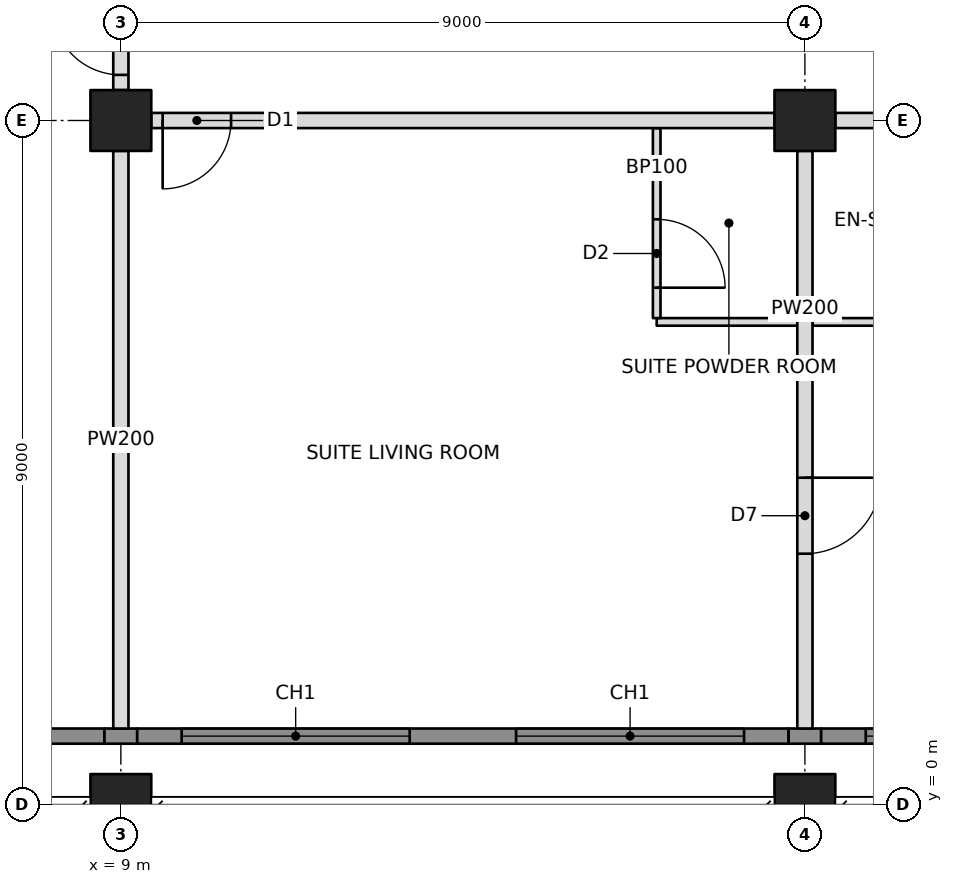
"""IFC4 building model, lengths in metres.
Left out: names, types, materials, properties, quantities, classifications, styles, units other than length and angle.
Written with IfcOpenShell. Run it as: python <this file> out.ifc"""

import sys

from ifc_helpers import new_model, si_unit, direction, frame, frame_2d, origin, origin_2d, place, context, subcontext, project, spatial, rectangle, hollow_rectangle, extrude, element, fill, save


model = new_model("IFC4")
c1 = context("Model", 3, precision=1e-05, world=origin(), true_north=direction((0.0, 1.0)))
c2 = subcontext(c1, "Body", "Model", "MODEL_VIEW")
j1 = project(units=[si_unit("LENGTHUNIT", "METRE"), si_unit("PLANEANGLEUNIT", "RADIAN")], contexts=[c1])
p1 = place(None, origin())
s1 = spatial("IfcSite", under=j1, at=p1, CompositionType="ELEMENT")
p2 = place(p1, origin())
s2 = spatial("IfcBuilding", under=s1, at=p2, CompositionType="ELEMENT")
p3 = place(p2, frame((0.0, 0.0, 218.2)))
s3 = spatial("IfcBuildingStorey", under=s2, at=p3, CompositionType="ELEMENT", Elevation=218.2)
p4 = place(p3, frame((9.0, 0.0, 0.0), z_axis=(0.0, 0.0, 1.0), x_axis=(1.0, 0.0, 0.0)))
e1 = element("IfcColumn", 1, at=p4, inside=s3, PredefinedType="COLUMN", context=c2, shape_type="SweptSolid", body=[
    extrude(hollow_rectangle(XDim=0.8, YDim=0.8, WallThickness=0.06, at=origin_2d()), origin(), (0.0, 0.0, 1.0), 3.4),
])
p5 = place(p3, frame((9.0, 9.0, 0.0), z_axis=(0.0, 0.0, 1.0), x_axis=(1.0, 0.0, 0.0)))
e2 = element("IfcColumn", 2, at=p5, inside=s3, PredefinedType="COLUMN", context=c2, shape_type="SweptSolid", body=[
    extrude(hollow_rectangle(XDim=0.8, YDim=0.8, WallThickness=0.1, at=origin_2d()), origin(), (0.0, 0.0, 1.0), 3.4),
])
p6 = place(p3, frame((18.0, 0.0, 0.0), z_axis=(0.0, 0.0, 1.0), x_axis=(1.0, 0.0, 0.0)))
e3 = element("IfcColumn", 3, at=p6, inside=s3, PredefinedType="COLUMN", context=c2, shape_type="SweptSolid", body=[
    extrude(hollow_rectangle(XDim=0.8, YDim=0.8, WallThickness=0.06, at=origin_2d()), origin(), (0.0, 0.0, 1.0), 3.4),
])
p7 = place(p3, frame((18.0, 9.0, 0.0), z_axis=(0.0, 0.0, 1.0), x_axis=(1.0, 0.0, 0.0)))
e4 = element("IfcColumn", 4, at=p7, inside=s3, PredefinedType="COLUMN", context=c2, shape_type="SweptSolid", body=[
    extrude(hollow_rectangle(XDim=0.8, YDim=0.8, WallThickness=0.1, at=origin_2d()), origin(), (0.0, 0.0, 1.0), 3.4),
])
p8 = place(p3, frame((3.0, 0.9, 0.0), z_axis=(0.0, 0.0, 1.0), x_axis=(1.0, 0.0, 0.0)))
e5 = element("IfcWall", 5, at=p8, inside=s3, PredefinedType="SOLIDWALL", context=c2, shape_type="SweptSolid", body=[
    extrude(rectangle(XDim=5.785, YDim=0.2, at=frame_2d((2.892, 0.0))), origin(), (0.0, 0.0, 1.0), 3.15),
])
p9 = place(p8, frame((1.45, 0.0, 0.6)))
e6 = element("IfcOpeningElement", 6, at=p9, cuts=e5, PredefinedType="OPENING", context=c2, shape_type="SweptSolid", body=[
    extrude(rectangle(XDim=3.0, YDim=2.2, at=frame_2d((1.5, 1.1))), frame((0.0, 0.11, 0.0), z_axis=(0.0, -1.0, 0.0), x_axis=(1.0, 0.0, 0.0)), (0.0, 0.0, 1.0), 0.22),
])
p10 = place(p3, frame((9.4, 9.0, 0.0), z_axis=(0.0, 0.0, 1.0), x_axis=(1.0, 0.0, 0.0)))
e7 = element("IfcWall", 7, at=p10, inside=s3, PredefinedType="PARTITIONING", context=c2, shape_type="SweptSolid", body=[
    extrude(rectangle(XDim=8.2, YDim=0.2, at=frame_2d((4.1, 0.0))), origin(), (0.0, 0.0, 1.0), 2.21),
])
p11 = place(p10, frame((0.15, 0.0, 0.0)))
e8 = element("IfcOpeningElement", 8, at=p11, cuts=e7, PredefinedType="OPENING", context=c2, shape_type="SweptSolid", body=[
    extrude(rectangle(XDim=0.9, YDim=2.1, at=frame_2d((0.45, 1.05))), frame((0.0, 0.11, 0.0), z_axis=(0.0, -1.0, 0.0), x_axis=(1.0, 0.0, 0.0)), (0.0, 0.0, 1.0), 0.22),
])
p12 = place(p3, frame((18.4, 9.0, 0.0), z_axis=(0.0, 0.0, 1.0), x_axis=(1.0, 0.0, 0.0)))
e9 = element("IfcWall", 9, at=p12, inside=s3, PredefinedType="PARTITIONING", context=c2, shape_type="SweptSolid", body=[
    extrude(rectangle(XDim=8.2, YDim=0.2, at=frame_2d((4.1, 0.0))), origin(), (0.0, 0.0, 1.0), 2.21),
])
p13 = place(p12, frame((2.95, 0.0, 0.0)))
e10 = element("IfcOpeningElement", 10, at=p13, cuts=e9, PredefinedType="OPENING", context=c2, shape_type="SweptSolid", body=[
    extrude(rectangle(XDim=0.9, YDim=2.1, at=frame_2d((0.45, 1.05))), frame((0.0, 0.11, 0.0), z_axis=(0.0, -1.0, 0.0), x_axis=(1.0, 0.0, 0.0)), (0.0, 0.0, 1.0), 0.22),
])
p14 = place(p12, frame((4.35, 0.0, 0.0)))
e11 = element("IfcOpeningElement", 11, at=p14, cuts=e9, PredefinedType="OPENING", context=c2, shape_type="SweptSolid", body=[
    extrude(rectangle(XDim=0.9, YDim=2.1, at=frame_2d((0.45, 1.05))), frame((0.0, 0.11, 0.0), z_axis=(0.0, -1.0, 0.0), x_axis=(1.0, 0.0, 0.0)), (0.0, 0.0, 1.0), 0.22),
])
p15 = place(p3, frame((9.0, 8.6, 0.0), z_axis=(0.0, 0.0, 1.0), x_axis=(0.0, -1.0, 0.0)))
e12 = element("IfcWall", 12, at=p15, inside=s3, PredefinedType="PARTITIONING", context=c2, shape_type="SweptSolid", body=[
    extrude(rectangle(XDim=7.6, YDim=0.2, at=frame_2d((3.8, 0.0))), origin(), (0.0, 0.0, 1.0), 2.21),
])
p16 = place(p3, frame((18.0, 8.6, 0.0), z_axis=(0.0, 0.0, 1.0), x_axis=(0.0, -1.0, 0.0)))
e13 = element("IfcWall", 13, at=p16, inside=s3, PredefinedType="PARTITIONING", context=c2, shape_type="SweptSolid", body=[
    extrude(rectangle(XDim=7.6, YDim=0.2, at=frame_2d((3.8, 0.0))), origin(), (0.0, 0.0, 1.0), 2.203),
])
p17 = place(p16, frame((4.3, 0.0, 0.0)))
e14 = element("IfcOpeningElement", 14, at=p17, cuts=e13, PredefinedType="OPENING", context=c2, shape_type="SweptSolid", body=[
    extrude(rectangle(XDim=1.0, YDim=2.1, at=frame_2d((0.5, 1.05))), frame((0.0, 0.11, 0.0), z_axis=(0.0, -1.0, 0.0), x_axis=(1.0, 0.0, 0.0)), (0.0, 0.0, 1.0), 0.22),
])
p18 = place(p3, frame((16.05, 6.35, 0.0), z_axis=(0.0, 0.0, 1.0), x_axis=(1.0, 0.0, 0.0)))
e15 = element("IfcWall", 15, at=p18, inside=s3, PredefinedType="PARTITIONING", context=c2, shape_type="SweptSolid", body=[
    extrude(rectangle(XDim=1.85, YDim=0.1, at=frame_2d((0.925, 0.0))), origin(), (0.0, 0.0, 1.0), 2.202),
])
p19 = place(p3, frame((16.05, 8.9, 0.0), z_axis=(0.0, 0.0, 1.0), x_axis=(0.0, -1.0, 0.0)))
e16 = element("IfcWall", 16, at=p19, inside=s3, PredefinedType="PARTITIONING", context=c2, shape_type="SweptSolid", body=[
    extrude(rectangle(XDim=2.5, YDim=0.1, at=frame_2d((1.25, 0.0))), origin(), (0.0, 0.0, 1.0), 2.21),
])
p20 = place(p19, frame((1.2, 0.0, 0.0)))
e17 = element("IfcOpeningElement", 17, at=p20, cuts=e16, PredefinedType="OPENING", context=c2, shape_type="SweptSolid", body=[
    extrude(rectangle(XDim=0.9, YDim=2.1, at=frame_2d((0.45, 1.05))), frame((0.0, 0.06, 0.0), z_axis=(0.0, -1.0, 0.0), x_axis=(1.0, 0.0, 0.0)), (0.0, 0.0, 1.0), 0.12),
])
p21 = place(p3, frame((18.1, 6.35, 0.0), z_axis=(0.0, 0.0, 1.0), x_axis=(1.0, 0.0, 0.0)))
e18 = element("IfcWall", 18, at=p21, inside=s3, PredefinedType="PARTITIONING", context=c2, shape_type="SweptSolid", body=[
    extrude(rectangle(XDim=2.95, YDim=0.1, at=frame_2d((1.475, 0.0))), origin(), (0.0, 0.0, 1.0), 2.202),
])
p22 = place(p3, frame((9.0, 9.4, 0.0), z_axis=(0.0, 0.0, 1.0), x_axis=(0.0, 1.0, 0.0)))
e19 = element("IfcWall", 19, at=p22, inside=s3, PredefinedType="PARTITIONING", context=c2, shape_type="SweptSolid", body=[
    extrude(rectangle(XDim=1.3, YDim=0.2, at=frame_2d((0.65, 0.0))), origin(), (0.0, 0.0, 1.0), 2.21),
])
p23 = place(p22, frame((0.2, 0.0, 0.0)))
e20 = element("IfcOpeningElement", 20, at=p23, cuts=e19, PredefinedType="OPENING", context=c2, shape_type="SweptSolid", body=[
    extrude(rectangle(XDim=0.9, YDim=2.1, at=frame_2d((0.45, 1.05))), frame((0.0, 0.11, 0.0), z_axis=(0.0, -1.0, 0.0), x_axis=(1.0, 0.0, 0.0)), (0.0, 0.0, 1.0), 0.22),
])
p24 = place(p3, frame((8.785, 0.9, 0.0), z_axis=(0.0, 0.0, 1.0), x_axis=(1.0, 0.0, 0.0)))
e21 = element("IfcWall", 21, at=p24, inside=s3, PredefinedType="SOLIDWALL", context=c2, shape_type="SweptSolid", body=[
    extrude(rectangle(XDim=0.431, YDim=0.2, at=frame_2d((0.215, 0.0))), origin(), (0.0, 0.0, 1.0), 2.21),
])
p25 = place(p3, frame((9.215, 0.9, 0.0), z_axis=(0.0, 0.0, 1.0), x_axis=(1.0, 0.0, 0.0)))
e22 = element("IfcWall", 22, at=p25, inside=s3, PredefinedType="SOLIDWALL", context=c2, shape_type="SweptSolid", body=[
    extrude(rectangle(XDim=8.571, YDim=0.2, at=frame_2d((4.285, 0.0))), origin(), (0.0, 0.0, 1.0), 3.15),
])
p26 = place(p25, frame((0.585, 0.0, 0.6)))
e23 = element("IfcOpeningElement", 23, at=p26, cuts=e22, PredefinedType="OPENING", context=c2, shape_type="SweptSolid", body=[
    extrude(rectangle(XDim=3.0, YDim=2.2, at=frame_2d((1.5, 1.1))), frame((0.0, 0.11, 0.0), z_axis=(0.0, -1.0, 0.0), x_axis=(1.0, 0.0, 0.0)), (0.0, 0.0, 1.0), 0.22),
])
p27 = place(p25, frame((4.985, 0.0, 0.6)))
e24 = element("IfcOpeningElement", 24, at=p27, cuts=e22, PredefinedType="OPENING", context=c2, shape_type="SweptSolid", body=[
    extrude(rectangle(XDim=3.0, YDim=2.2, at=frame_2d((1.5, 1.1))), frame((0.0, 0.11, 0.0), z_axis=(0.0, -1.0, 0.0), x_axis=(1.0, 0.0, 0.0)), (0.0, 0.0, 1.0), 0.22),
])
p28 = place(p3, frame((17.786, 0.9, 0.0), z_axis=(0.0, 0.0, 1.0), x_axis=(1.0, 0.0, 0.0)))
e25 = element("IfcWall", 25, at=p28, inside=s3, PredefinedType="SOLIDWALL", context=c2, shape_type="SweptSolid", body=[
    extrude(rectangle(XDim=0.428, YDim=0.2, at=frame_2d((0.214, 0.0))), origin(), (0.0, 0.0, 1.0), 2.202),
])
p29 = place(p3, frame((18.214, 0.9, 0.0), z_axis=(0.0, 0.0, 1.0), x_axis=(1.0, 0.0, 0.0)))
e26 = element("IfcWall", 26, at=p29, inside=s3, PredefinedType="SOLIDWALL", context=c2, shape_type="SweptSolid", body=[
    extrude(rectangle(XDim=8.572, YDim=0.2, at=frame_2d((4.286, 0.0))), origin(), (0.0, 0.0, 1.0), 3.15),
])
p30 = place(p29, frame((0.586, 0.0, 0.6)))
e27 = element("IfcOpeningElement", 27, at=p30, cuts=e26, PredefinedType="OPENING", context=c2, shape_type="SweptSolid", body=[
    extrude(rectangle(XDim=3.0, YDim=2.2, at=frame_2d((1.5, 1.1))), frame((0.0, 0.11, 0.0), z_axis=(0.0, -1.0, 0.0), x_axis=(1.0, 0.0, 0.0)), (0.0, 0.0, 1.0), 0.22),
])
p31 = place(p29, frame((4.986, 0.0, 0.6)))
e28 = element("IfcOpeningElement", 28, at=p31, cuts=e26, PredefinedType="OPENING", context=c2, shape_type="SweptSolid", body=[
    extrude(rectangle(XDim=3.0, YDim=2.2, at=frame_2d((1.5, 1.1))), frame((0.0, 0.11, 0.0), z_axis=(0.0, -1.0, 0.0), x_axis=(1.0, 0.0, 0.0)), (0.0, 0.0, 1.0), 0.22),
])
p32 = place(p26, origin())
e29 = element("IfcWindow", 29, at=p32, inside=s3, PartitioningType="TRIPLE_PANEL_VERTICAL", PredefinedType="WINDOW", context=c2, shape_type="SweptSolid", body=[
    extrude(rectangle(XDim=3.0, YDim=2.2, at=frame_2d((1.5, 1.1))), frame((0.0, 0.03, 0.0), z_axis=(0.0, -1.0, 0.0), x_axis=(1.0, 0.0, 0.0)), (0.0, 0.0, 1.0), 0.06),
])
fill(e23, e29)
p33 = place(p27, origin())
e30 = element("IfcWindow", 30, at=p33, inside=s3, PartitioningType="TRIPLE_PANEL_VERTICAL", PredefinedType="WINDOW", context=c2, shape_type="SweptSolid", body=[
    extrude(rectangle(XDim=3.0, YDim=2.2, at=frame_2d((1.5, 1.1))), frame((0.0, 0.03, 0.0), z_axis=(0.0, -1.0, 0.0), x_axis=(1.0, 0.0, 0.0)), (0.0, 0.0, 1.0), 0.06),
])
fill(e24, e30)
p34 = place(p30, origin())
e31 = element("IfcWindow", 31, at=p34, inside=s3, PartitioningType="TRIPLE_PANEL_VERTICAL", PredefinedType="WINDOW", context=c2, shape_type="SweptSolid", body=[
    extrude(rectangle(XDim=3.0, YDim=2.2, at=frame_2d((1.5, 1.1))), frame((0.0, 0.03, 0.0), z_axis=(0.0, -1.0, 0.0), x_axis=(1.0, 0.0, 0.0)), (0.0, 0.0, 1.0), 0.06),
])
fill(e27, e31)
p35 = place(p17, origin())
e32 = element("IfcDoor", 32, at=p35, inside=s3, OperationType="SINGLE_SWING_LEFT", PredefinedType="DOOR", context=c2, shape_type="SweptSolid", body=[
    extrude(rectangle(XDim=1.0, YDim=2.1, at=frame_2d((0.5, 1.05))), frame((0.0, 0.025, 0.0), z_axis=(0.0, -1.0, 0.0), x_axis=(1.0, 0.0, 0.0)), (0.0, 0.0, 1.0), 0.05),
])
fill(e14, e32)
p36 = place(p20, origin())
e33 = element("IfcDoor", 33, at=p36, inside=s3, OperationType="SINGLE_SWING_RIGHT", PredefinedType="DOOR", context=c2, shape_type="SweptSolid", body=[
    extrude(rectangle(XDim=0.9, YDim=2.1, at=frame_2d((0.45, 1.05))), frame((0.0, 0.025, 0.0), z_axis=(0.0, -1.0, 0.0), x_axis=(1.0, 0.0, 0.0)), (0.0, 0.0, 1.0), 0.05),
])
fill(e17, e33)
p37 = place(p11, frame((0.9, 0.0, 0.0), z_axis=(0.0, 0.0, 1.0), x_axis=(-1.0, 0.0, 0.0)))
e34 = element("IfcDoor", 34, at=p37, inside=s3, OperationType="SINGLE_SWING_RIGHT", PredefinedType="DOOR", context=c2, shape_type="SweptSolid", body=[
    extrude(rectangle(XDim=0.9, YDim=2.1, at=frame_2d((0.45, 1.05))), frame((0.0, 0.025, 0.0), z_axis=(0.0, -1.0, 0.0), x_axis=(1.0, 0.0, 0.0)), (0.0, 0.0, 1.0), 0.05),
])
fill(e8, e34)
p38 = place(p23, origin())
e35 = element("IfcDoor", 35, at=p38, inside=s3, OperationType="SINGLE_SWING_RIGHT", PredefinedType="DOOR", context=c2, shape_type="SweptSolid", body=[
    extrude(rectangle(XDim=0.9, YDim=2.1, at=frame_2d((0.45, 1.05))), frame((0.0, 0.025, 0.0), z_axis=(0.0, -1.0, 0.0), x_axis=(1.0, 0.0, 0.0)), (0.0, 0.0, 1.0), 0.05),
])
fill(e20, e35)
save(model, sys.argv[1])
